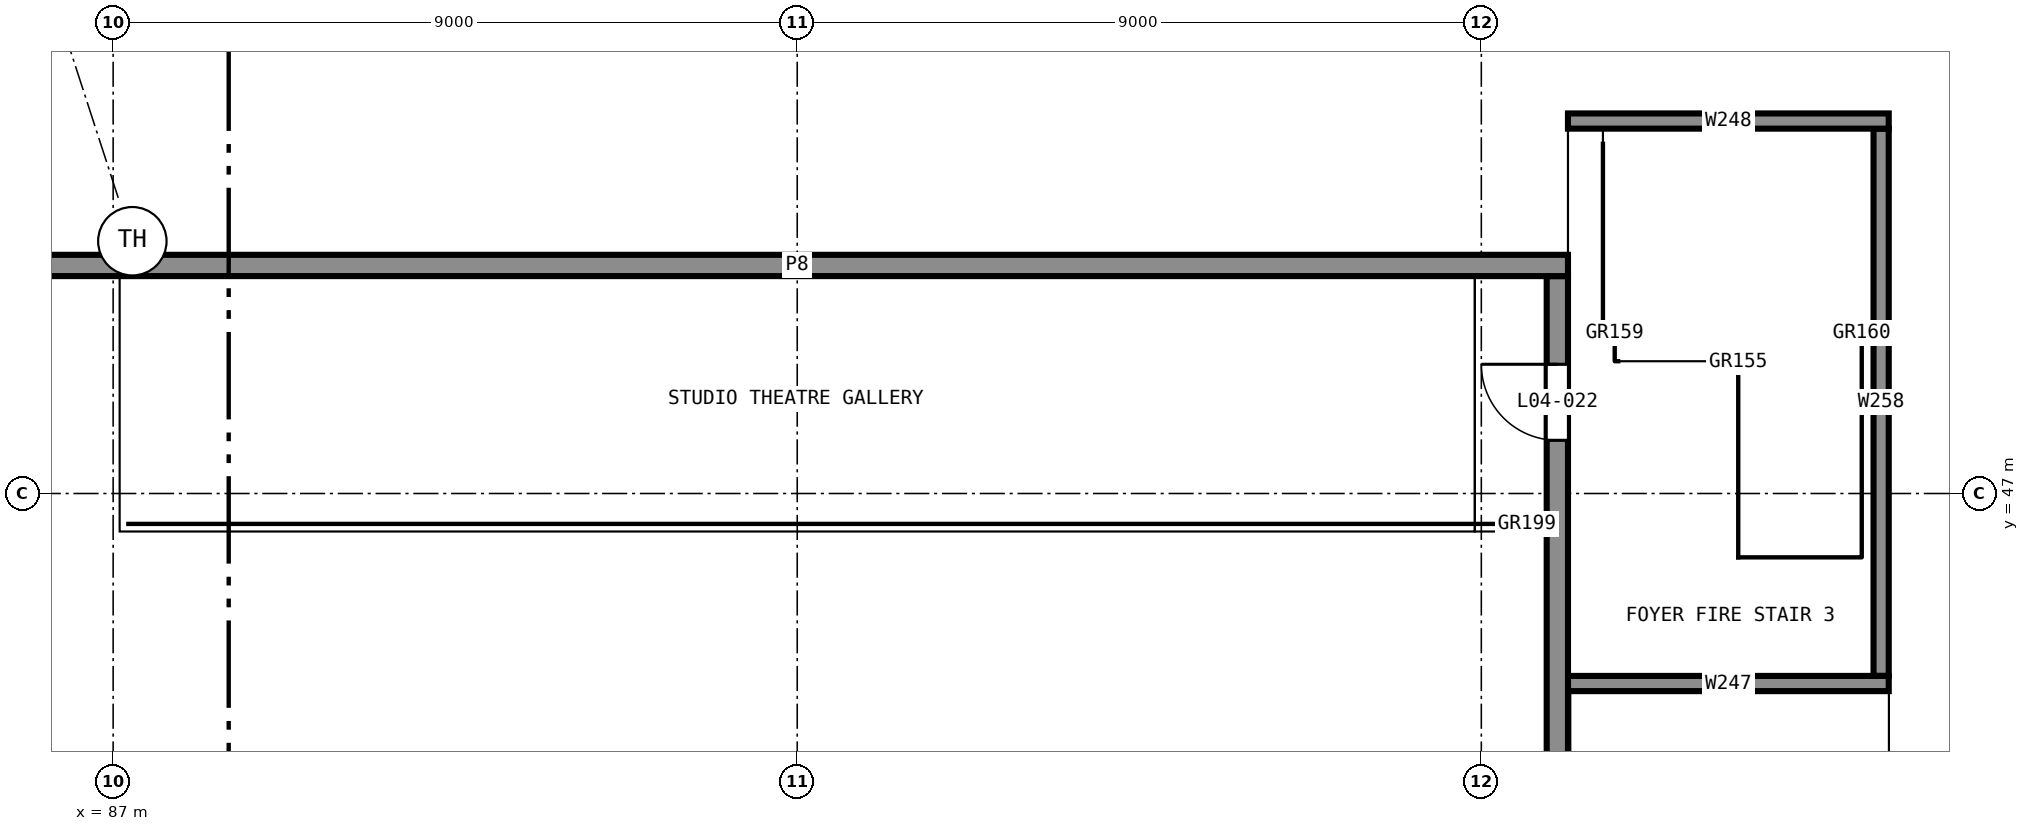
"""IFC4 building model, lengths in metres.
Left out: names, types, materials, properties, quantities, classifications, styles, units other than length and angle.
Written with IfcOpenShell. Run it as: python <this file> out.ifc"""

import sys

from ifc_helpers import new_model, si_unit, direction, frame, frame_2d, origin, place, context, subcontext, project, spatial, rectangle, extrude, element, fill, save


model = new_model("IFC4")
c1 = context("Model", 3, precision=1e-05, world=origin(), true_north=direction((0.0, 1.0)))
c2 = subcontext(c1, "Body", "Model", "MODEL_VIEW")
j1 = project(units=[si_unit("LENGTHUNIT", "METRE"), si_unit("PLANEANGLEUNIT", "RADIAN")], contexts=[c1])
p1 = place(None, origin())
s1 = spatial("IfcSite", under=j1, at=p1, CompositionType="ELEMENT")
p2 = place(p1, origin())
s2 = spatial("IfcBuilding", under=s1, at=p2, CompositionType="ELEMENT")
p3 = place(p2, frame((0.0, 0.0, 17.5)))
s3 = spatial("IfcBuildingStorey", under=s2, at=p3, CompositionType="ELEMENT", Elevation=17.5)
for number, where, z_axis, x_axis in (
    (1, (106.14, 44.5, 0.0), (0.0, 0.0, 1.0), (1.0, 0.0, 0.0)),
    (2, (110.36, 51.9, 0.0), (0.0, 0.0, 1.0), (-1.0, 0.0, 0.0)),
):
    element("IfcWall", number, at=place(p3, frame(where, z_axis=z_axis, x_axis=x_axis)), inside=s3, PredefinedType="SHEAR", context=c2, shape_type="SweptSolid", body=[
        extrude(rectangle(XDim=4.22, YDim=0.2, at=frame_2d((2.11, 0.0))), origin(), (0.0, 0.0, 1.0), 3.8),
    ])
p4 = place(p3, frame((110.26, 44.6, 0.0), z_axis=(0.0, 0.0, 1.0), x_axis=(0.0, 1.0, 0.0)))
e3 = element("IfcWall", 3, at=p4, inside=s3, PredefinedType="SHEAR", context=c2, shape_type="SweptSolid", body=[
    extrude(rectangle(XDim=7.2, YDim=0.2, at=frame_2d((3.6, 0.0))), origin(), (0.0, 0.0, 1.0), 3.8),
])
p5 = place(p3, frame((106.0, 31.14, 0.0), z_axis=(0.0, 0.0, 1.0), x_axis=(0.0, 1.0, 0.0)))
e4 = element("IfcWall", 4, at=p5, inside=s3, PredefinedType="SOLIDWALL", context=c2, shape_type="SweptSolid", body=[
    extrude(rectangle(XDim=18.72, YDim=0.28, at=frame_2d((9.36, 0.0))), origin(), (0.0, 0.0, 1.0), 3.8),
])
p6 = place(p5, frame((16.56, 0.0, 0.0)))
e5 = element("IfcOpeningElement", 5, at=p6, cuts=e4, PredefinedType="OPENING", context=c2, shape_type="SweptSolid", body=[
    extrude(rectangle(XDim=1.0, YDim=2.1, at=frame_2d((0.5, 1.05))), frame((0.0, 0.15, 0.0), z_axis=(0.0, -1.0, 0.0), x_axis=(1.0, 0.0, 0.0)), (0.0, 0.0, 1.0), 0.3),
])
p7 = place(p3, frame((106.14, 50.0, 0.0), z_axis=(0.0, 0.0, 1.0), x_axis=(-1.0, 0.0, 0.0)))
e6 = element("IfcWall", 6, at=p7, inside=s3, PredefinedType="SOLIDWALL", context=c2, shape_type="SweptSolid", body=[
    extrude(rectangle(XDim=20.28, YDim=0.28, at=frame_2d((10.14, 0.0))), origin(), (0.0, 0.0, 1.0), 3.8),
])
p8 = place(p6, origin())
e7 = element("IfcDoor", 7, at=p8, inside=s3, OperationType="SINGLE_SWING_LEFT", PredefinedType="DOOR", context=c2, shape_type="SweptSolid", body=[
    extrude(rectangle(XDim=1.0, YDim=2.1, at=frame_2d((0.5, 1.05))), frame((0.0, 0.025, 0.0), z_axis=(0.0, -1.0, 0.0), x_axis=(1.0, 0.0, 0.0)), (0.0, 0.0, 1.0), 0.05),
])
fill(e5, e7)
save(model, sys.argv[1])
